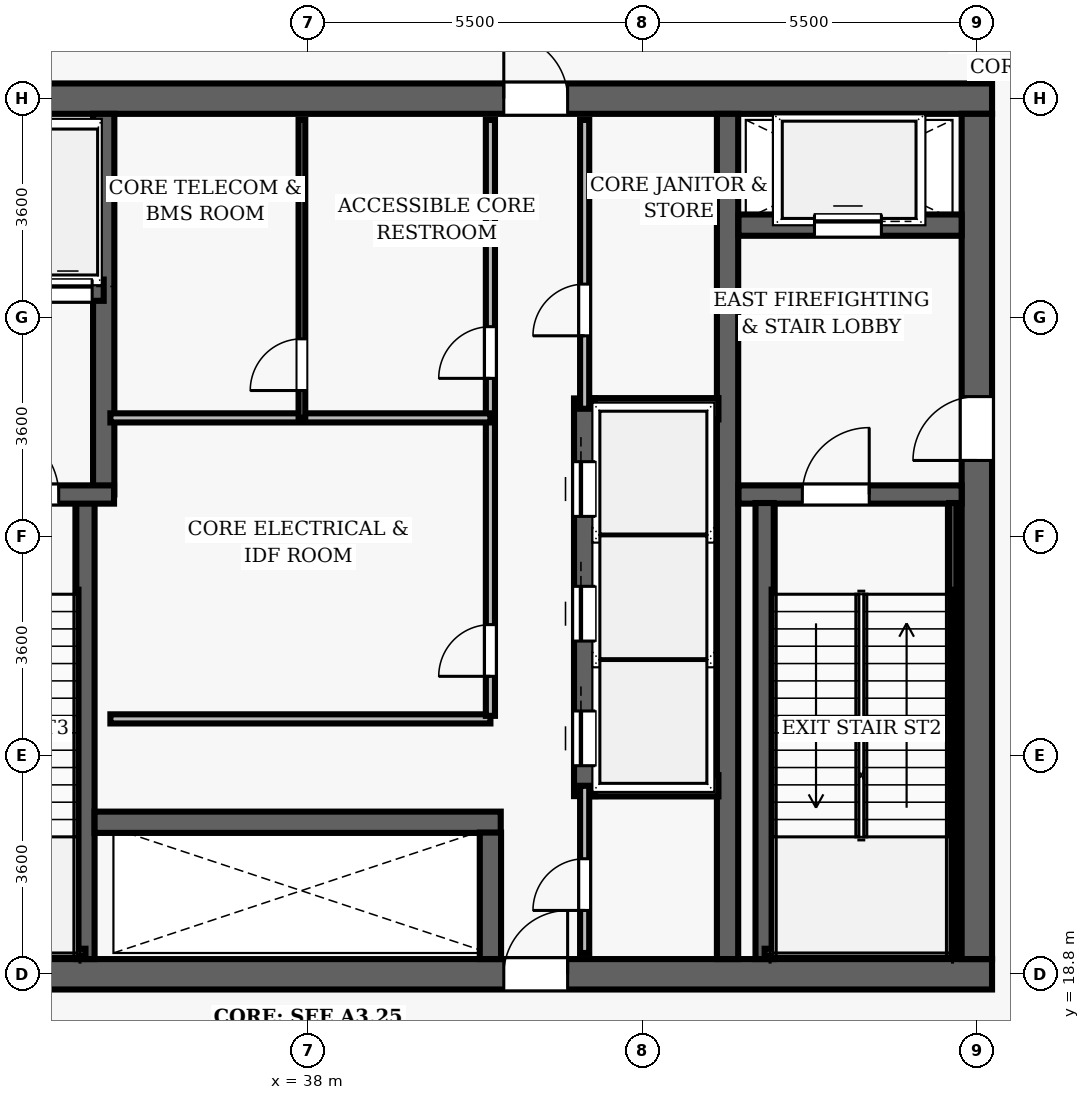
"""IFC4 building model, lengths in metres.
Left out: names, types, materials, properties, quantities, classifications, styles, units other than length and angle.
Written with IfcOpenShell. Run it as: python <this file> out.ifc"""

import sys

from ifc_helpers import new_model, si_unit, direction, frame, frame_2d, origin, place, context, subcontext, project, spatial, rectangle, extrude, element, fill, save


model = new_model("IFC4")
c1 = context("Model", 3, precision=1e-05, world=origin(), true_north=direction((0.0, 1.0)))
c2 = subcontext(c1, "Body", "Model", "MODEL_VIEW")
j1 = project(units=[si_unit("LENGTHUNIT", "METRE"), si_unit("PLANEANGLEUNIT", "RADIAN")], contexts=[c1])
p1 = place(None, origin())
s1 = spatial("IfcSite", under=j1, at=p1, CompositionType="ELEMENT")
p2 = place(p1, origin())
s2 = spatial("IfcBuilding", under=s1, at=p2, CompositionType="ELEMENT")
p3 = place(p2, frame((0.0, 0.0, 236.65)))
s3 = spatial("IfcBuildingStorey", under=s2, at=p3, CompositionType="ELEMENT", Elevation=236.65)
p4 = place(p3, frame((26.75, 18.8, 0.0), z_axis=(0.0, 0.0, 1.0), x_axis=(1.0, 0.0, 0.0)))
e1 = element("IfcWall", 1, at=p4, inside=s3, PredefinedType="SHEAR", context=c2, shape_type="SweptSolid", body=[
    extrude(rectangle(XDim=22.5, YDim=0.5, at=frame_2d((11.25, 0.0))), origin(), (0.0, 0.0, 1.0), 5.4),
])
p5 = place(p4, frame((14.47, 0.0, 0.0)))
e2 = element("IfcOpeningElement", 2, at=p5, cuts=e1, PredefinedType="OPENING", context=c2, shape_type="SweptSolid", body=[
    extrude(rectangle(XDim=1.05, YDim=2.15, at=frame_2d((0.525, 1.075))), frame((0.0, 0.26, 0.0), z_axis=(0.0, -1.0, 0.0), x_axis=(1.0, 0.0, 0.0)), (0.0, 0.0, 1.0), 0.52),
])
p6 = place(p3, frame((26.75, 33.2, 0.0), z_axis=(0.0, 0.0, 1.0), x_axis=(1.0, 0.0, 0.0)))
e3 = element("IfcWall", 3, at=p6, inside=s3, PredefinedType="SHEAR", context=c2, shape_type="SweptSolid", body=[
    extrude(rectangle(XDim=22.5, YDim=0.5, at=frame_2d((11.25, 0.0))), origin(), (0.0, 0.0, 1.0), 5.4),
])
p7 = place(p6, frame((4.57, 0.0, 0.0)))
e4 = element("IfcOpeningElement", 4, at=p7, cuts=e3, PredefinedType="OPENING", context=c2, shape_type="SweptSolid", body=[
    extrude(rectangle(XDim=1.05, YDim=2.15, at=frame_2d((0.525, 1.075))), frame((0.0, 0.26, 0.0), z_axis=(0.0, -1.0, 0.0), x_axis=(1.0, 0.0, 0.0)), (0.0, 0.0, 1.0), 0.52),
])
p8 = place(p6, frame((14.47, 0.0, 0.0)))
e5 = element("IfcOpeningElement", 5, at=p8, cuts=e3, PredefinedType="OPENING", context=c2, shape_type="SweptSolid", body=[
    extrude(rectangle(XDim=1.05, YDim=2.15, at=frame_2d((0.525, 1.075))), frame((0.0, 0.26, 0.0), z_axis=(0.0, -1.0, 0.0), x_axis=(1.0, 0.0, 0.0)), (0.0, 0.0, 1.0), 0.52),
])
p9 = place(p3, frame((49.0, 19.05, 0.0), z_axis=(0.0, 0.0, 1.0), x_axis=(0.0, 1.0, 0.0)))
e6 = element("IfcWall", 6, at=p9, inside=s3, PredefinedType="SHEAR", context=c2, shape_type="SweptSolid", body=[
    extrude(rectangle(XDim=13.9, YDim=0.5, at=frame_2d((6.95, 0.0))), origin(), (0.0, 0.0, 1.0), 5.4),
])
p10 = place(p9, frame((8.2, 0.0, 0.0)))
e7 = element("IfcOpeningElement", 7, at=p10, cuts=e6, PredefinedType="OPENING", context=c2, shape_type="SweptSolid", body=[
    extrude(rectangle(XDim=1.05, YDim=2.15, at=frame_2d((0.525, 1.075))), frame((0.0, 0.26, 0.0), z_axis=(0.0, -1.0, 0.0), x_axis=(1.0, 0.0, 0.0)), (0.0, 0.0, 1.0), 0.52),
])
p11 = place(p3, frame((44.9, 19.05, 0.0), z_axis=(0.0, 0.0, 1.0), x_axis=(0.0, 1.0, 0.0)))
e8 = element("IfcWall", 8, at=p11, inside=s3, PredefinedType="SHEAR", context=c2, shape_type="SweptSolid", body=[
    extrude(rectangle(XDim=13.9, YDim=0.35, at=frame_2d((6.95, 0.0))), origin(), (0.0, 0.0, 1.0), 5.4),
])
p12 = place(p3, frame((45.08, 26.69, 0.0), z_axis=(0.0, 0.0, 1.0), x_axis=(1.0, 0.0, 0.0)))
e9 = element("IfcWall", 9, at=p12, inside=s3, PredefinedType="SHEAR", context=c2, shape_type="SweptSolid", body=[
    extrude(rectangle(XDim=3.67, YDim=0.3, at=frame_2d((1.835, 0.0))), origin(), (0.0, 0.0, 1.0), 5.4),
])
p13 = place(p12, frame((1.05, 0.0, 0.0)))
e10 = element("IfcOpeningElement", 10, at=p13, cuts=e9, PredefinedType="OPENING", context=c2, shape_type="SweptSolid", body=[
    extrude(rectangle(XDim=1.1, YDim=2.15, at=frame_2d((0.55, 1.075))), frame((0.0, 0.16, 0.0), z_axis=(0.0, -1.0, 0.0), x_axis=(1.0, 0.0, 0.0)), (0.0, 0.0, 1.0), 0.32),
])
p14 = place(p3, frame((45.51, 19.05, 0.0), z_axis=(0.0, 0.0, 1.0), x_axis=(0.0, 1.0, 0.0)))
e11 = element("IfcWall", 11, at=p14, inside=s3, PredefinedType="SHEAR", context=c2, shape_type="SweptSolid", body=[
    extrude(rectangle(XDim=7.5, YDim=0.3, at=frame_2d((3.75, 0.0))), origin(), (0.0, 0.0, 1.0), 5.4),
])
p15 = place(p3, frame((48.605, 19.1, 0.0), z_axis=(0.0, 0.0, 1.0), x_axis=(0.0, 1.0, 0.0)))
e12 = element("IfcWall", 12, at=p15, inside=s3, PredefinedType="SHEAR", context=c2, shape_type="SweptSolid", body=[
    extrude(rectangle(XDim=7.45, YDim=0.12, at=frame_2d((3.725, 0.0))), origin(), (0.0, 0.0, 1.0), 5.4),
])
p16 = place(p3, frame((45.51, 19.16, 0.0), z_axis=(0.0, 0.0, 1.0), x_axis=(1.0, 0.0, 0.0)))
e13 = element("IfcWall", 13, at=p16, inside=s3, PredefinedType="SHEAR", context=c2, shape_type="SweptSolid", body=[
    extrude(rectangle(XDim=3.095, YDim=0.12, at=frame_2d((1.547, 0.0))), origin(), (0.0, 0.0, 1.0), 5.4),
])
p17 = place(p3, frame((45.08, 31.12, 0.0), z_axis=(0.0, 0.0, 1.0), x_axis=(1.0, 0.0, 0.0)))
e14 = element("IfcWall", 14, at=p17, inside=s3, PredefinedType="SHEAR", context=c2, shape_type="SweptSolid", body=[
    extrude(rectangle(XDim=3.67, YDim=0.35, at=frame_2d((1.835, 0.0))), origin(), (0.0, 0.0, 1.0), 4.04),
])
p18 = place(p17, frame((1.25, 0.0, 0.0)))
e15 = element("IfcOpeningElement", 15, at=p18, cuts=e14, PredefinedType="OPENING", context=c2, shape_type="SweptSolid", body=[
    extrude(rectangle(XDim=1.1, YDim=2.15, at=frame_2d((0.55, 1.075))), frame((0.0, 0.185, 0.0), z_axis=(0.0, -1.0, 0.0), x_axis=(1.0, 0.0, 0.0)), (0.0, 0.0, 1.0), 0.37),
])
p19 = place(p3, frame((34.34, 19.05, 0.0), z_axis=(0.0, 0.0, 1.0), x_axis=(0.0, 1.0, 0.0)))
e16 = element("IfcWall", 16, at=p19, inside=s3, PredefinedType="SHEAR", context=c2, shape_type="SweptSolid", body=[
    extrude(rectangle(XDim=7.5, YDim=0.3, at=frame_2d((3.75, 0.0))), origin(), (0.0, 0.0, 1.0), 5.4),
])
p20 = place(p3, frame((34.64, 26.69, 0.0), z_axis=(0.0, 0.0, 1.0), x_axis=(0.0, 1.0, 0.0)))
e17 = element("IfcWall", 17, at=p20, inside=s3, PredefinedType="SHEAR", context=c2, shape_type="SweptSolid", body=[
    extrude(rectangle(XDim=6.26, YDim=0.35, at=frame_2d((3.13, 0.0))), origin(), (0.0, 0.0, 1.0), 5.4),
])
p21 = place(p3, frame((31.25, 26.69, 0.0), z_axis=(0.0, 0.0, 1.0), x_axis=(1.0, 0.0, 0.0)))
e18 = element("IfcWall", 18, at=p21, inside=s3, PredefinedType="SHEAR", context=c2, shape_type="SweptSolid", body=[
    extrude(rectangle(XDim=3.56, YDim=0.3, at=frame_2d((1.78, 0.0))), origin(), (0.0, 0.0, 1.0), 5.4),
])
p22 = place(p21, frame((1.55, 0.0, 0.0)))
e19 = element("IfcOpeningElement", 19, at=p22, cuts=e18, PredefinedType="OPENING", context=c2, shape_type="SweptSolid", body=[
    extrude(rectangle(XDim=1.1, YDim=2.15, at=frame_2d((0.55, 1.075))), frame((0.0, 0.16, 0.0), z_axis=(0.0, -1.0, 0.0), x_axis=(1.0, 0.0, 0.0)), (0.0, 0.0, 1.0), 0.32),
])
p23 = place(p3, frame((31.3, 19.16, 0.0), z_axis=(0.0, 0.0, 1.0), x_axis=(1.0, 0.0, 0.0)))
e20 = element("IfcWall", 20, at=p23, inside=s3, PredefinedType="SHEAR", context=c2, shape_type="SweptSolid", body=[
    extrude(rectangle(XDim=3.04, YDim=0.12, at=frame_2d((1.52, 0.0))), origin(), (0.0, 0.0, 1.0), 5.4),
])
p24 = place(p3, frame((32.23, 30.05, 0.0), z_axis=(0.0, 0.0, 1.0), x_axis=(1.0, 0.0, 0.0)))
e21 = element("IfcWall", 21, at=p24, inside=s3, PredefinedType="SHEAR", context=c2, shape_type="SweptSolid", body=[
    extrude(rectangle(XDim=2.41, YDim=0.35, at=frame_2d((1.205, 0.0))), origin(), (0.0, 0.0, 1.0), 4.04),
])
p25 = place(p24, frame((0.42, 0.0, 0.0)))
e22 = element("IfcOpeningElement", 22, at=p25, cuts=e21, PredefinedType="OPENING", context=c2, shape_type="SweptSolid", body=[
    extrude(rectangle(XDim=0.8, YDim=2.15, at=frame_2d((0.4, 1.075))), frame((0.0, 0.185, 0.0), z_axis=(0.0, -1.0, 0.0), x_axis=(1.0, 0.0, 0.0)), (0.0, 0.0, 1.0), 0.37),
])
p26 = place(p24, frame((1.42, 0.0, 0.0)))
e23 = element("IfcOpeningElement", 23, at=p26, cuts=e21, PredefinedType="OPENING", context=c2, shape_type="SweptSolid", body=[
    extrude(rectangle(XDim=0.8, YDim=2.15, at=frame_2d((0.4, 1.075))), frame((0.0, 0.185, 0.0), z_axis=(0.0, -1.0, 0.0), x_axis=(1.0, 0.0, 0.0)), (0.0, 0.0, 1.0), 0.37),
])
p27 = place(p3, frame((42.55, 21.73, 0.0), z_axis=(0.0, 0.0, 1.0), x_axis=(0.0, 1.0, 0.0)))
e24 = element("IfcWall", 24, at=p27, inside=s3, PredefinedType="SHEAR", context=c2, shape_type="SweptSolid", body=[
    extrude(rectangle(XDim=6.54, YDim=0.35, at=frame_2d((3.27, 0.0))), origin(), (0.0, 0.0, 1.0), 4.04),
])
p28 = place(p27, frame((0.5, 0.0, 0.0)))
e25 = element("IfcOpeningElement", 25, at=p28, cuts=e24, PredefinedType="OPENING", context=c2, shape_type="SweptSolid", body=[
    extrude(rectangle(XDim=0.9, YDim=2.15, at=frame_2d((0.45, 1.075))), frame((0.0, 0.185, 0.0), z_axis=(0.0, -1.0, 0.0), x_axis=(1.0, 0.0, 0.0)), (0.0, 0.0, 1.0), 0.37),
])
p29 = place(p27, frame((2.55, 0.0, 0.0)))
e26 = element("IfcOpeningElement", 26, at=p29, cuts=e24, PredefinedType="OPENING", context=c2, shape_type="SweptSolid", body=[
    extrude(rectangle(XDim=0.9, YDim=2.15, at=frame_2d((0.45, 1.075))), frame((0.0, 0.185, 0.0), z_axis=(0.0, -1.0, 0.0), x_axis=(1.0, 0.0, 0.0)), (0.0, 0.0, 1.0), 0.37),
])
p30 = place(p27, frame((4.6, 0.0, 0.0)))
e27 = element("IfcOpeningElement", 27, at=p30, cuts=e24, PredefinedType="OPENING", context=c2, shape_type="SweptSolid", body=[
    extrude(rectangle(XDim=0.9, YDim=2.15, at=frame_2d((0.45, 1.075))), frame((0.0, 0.185, 0.0), z_axis=(0.0, -1.0, 0.0), x_axis=(1.0, 0.0, 0.0)), (0.0, 0.0, 1.0), 0.37),
])
for number, where, z_axis, x_axis in (
    (28, (42.72, 21.9, 0.0), (0.0, 0.0, 1.0), (1.0, 0.0, 0.0)),
    (29, (42.72, 28.1, 0.0), (0.0, 0.0, 1.0), (1.0, 0.0, 0.0)),
):
    element("IfcWall", number, at=place(p3, frame(where, z_axis=z_axis, x_axis=x_axis)), inside=s3, PredefinedType="SHEAR", context=c2, shape_type="SweptSolid", body=[
        extrude(rectangle(XDim=2.03, YDim=0.35, at=frame_2d((1.015, 0.0))), origin(), (0.0, 0.0, 1.0), 4.04),
    ])
p31 = place(p3, frame((34.49, 21.3, 0.0), z_axis=(0.0, 0.0, 1.0), x_axis=(1.0, 0.0, 0.0)))
e30 = element("IfcWall", 30, at=p31, inside=s3, PredefinedType="SHEAR", context=c2, shape_type="SweptSolid", body=[
    extrude(rectangle(XDim=6.68, YDim=0.35, at=frame_2d((3.34, 0.0))), origin(), (0.0, 0.0, 1.0), 4.04),
])
p32 = place(p3, frame((41.0, 19.05, 0.0), z_axis=(0.0, 0.0, 1.0), x_axis=(0.0, 1.0, 0.0)))
e31 = element("IfcWall", 31, at=p32, inside=s3, PredefinedType="SHEAR", context=c2, shape_type="SweptSolid", body=[
    extrude(rectangle(XDim=2.08, YDim=0.35, at=frame_2d((1.04, 0.0))), origin(), (0.0, 0.0, 1.0), 4.04),
])
p33 = place(p3, frame((34.75, 23.0, 0.0), z_axis=(0.0, 0.0, 1.0), x_axis=(1.0, 0.0, 0.0)))
e32 = element("IfcWall", 32, at=p33, inside=s3, PredefinedType="PARTITIONING", context=c2, shape_type="SweptSolid", body=[
    extrude(rectangle(XDim=6.25, YDim=0.15, at=frame_2d((3.125, 0.0))), origin(), (0.0, 0.0, 1.0), 4.04),
])
p34 = place(p3, frame((41.0, 23.05, 0.0), z_axis=(0.0, 0.0, 1.0), x_axis=(0.0, 1.0, 0.0)))
e33 = element("IfcWall", 33, at=p34, inside=s3, PredefinedType="PARTITIONING", context=c2, shape_type="SweptSolid", body=[
    extrude(rectangle(XDim=9.8, YDim=0.15, at=frame_2d((4.9, 0.0))), origin(), (0.0, 0.0, 1.0), 4.04),
])
p35 = place(p34, frame((0.65, 0.0, 0.0)))
e34 = element("IfcOpeningElement", 34, at=p35, cuts=e33, PredefinedType="OPENING", context=c2, shape_type="SweptSolid", body=[
    extrude(rectangle(XDim=0.85, YDim=2.1, at=frame_2d((0.425, 1.05))), frame((0.0, 0.085, 0.0), z_axis=(0.0, -1.0, 0.0), x_axis=(1.0, 0.0, 0.0)), (0.0, 0.0, 1.0), 0.17),
])
p36 = place(p34, frame((5.55, 0.0, 0.0)))
e35 = element("IfcOpeningElement", 35, at=p36, cuts=e33, PredefinedType="OPENING", context=c2, shape_type="SweptSolid", body=[
    extrude(rectangle(XDim=0.85, YDim=2.1, at=frame_2d((0.425, 1.05))), frame((0.0, 0.085, 0.0), z_axis=(0.0, -1.0, 0.0), x_axis=(1.0, 0.0, 0.0)), (0.0, 0.0, 1.0), 0.17),
])
p37 = place(p3, frame((34.75, 27.95, 0.0), z_axis=(0.0, 0.0, 1.0), x_axis=(1.0, 0.0, 0.0)))
e36 = element("IfcWall", 36, at=p37, inside=s3, PredefinedType="PARTITIONING", context=c2, shape_type="SweptSolid", body=[
    extrude(rectangle(XDim=6.25, YDim=0.15, at=frame_2d((3.125, 0.0))), origin(), (0.0, 0.0, 1.0), 4.04),
])
p38 = place(p3, frame((37.9, 27.95, 0.0), z_axis=(0.0, 0.0, 1.0), x_axis=(0.0, 1.0, 0.0)))
e37 = element("IfcWall", 37, at=p38, inside=s3, PredefinedType="PARTITIONING", context=c2, shape_type="SweptSolid", body=[
    extrude(rectangle(XDim=4.9, YDim=0.11, at=frame_2d((2.45, 0.0))), origin(), (0.0, 0.0, 1.0), 4.04),
])
p39 = place(p38, frame((0.45, 0.0, 0.0)))
e38 = element("IfcOpeningElement", 38, at=p39, cuts=e37, PredefinedType="OPENING", context=c2, shape_type="SweptSolid", body=[
    extrude(rectangle(XDim=0.85, YDim=2.1, at=frame_2d((0.425, 1.05))), frame((0.0, 0.065, 0.0), z_axis=(0.0, -1.0, 0.0), x_axis=(1.0, 0.0, 0.0)), (0.0, 0.0, 1.0), 0.13),
])
p40 = place(p3, frame((42.55, 28.1, 0.0), z_axis=(0.0, 0.0, 1.0), x_axis=(0.0, 1.0, 0.0)))
e39 = element("IfcWall", 39, at=p40, inside=s3, PredefinedType="PARTITIONING", context=c2, shape_type="SweptSolid", body=[
    extrude(rectangle(XDim=4.75, YDim=0.15, at=frame_2d((2.375, 0.0))), origin(), (0.0, 0.0, 1.0), 4.04),
])
p41 = place(p40, frame((1.2, 0.0, 0.0)))
e40 = element("IfcOpeningElement", 40, at=p41, cuts=e39, PredefinedType="OPENING", context=c2, shape_type="SweptSolid", body=[
    extrude(rectangle(XDim=0.85, YDim=2.1, at=frame_2d((0.425, 1.05))), frame((0.0, 0.085, 0.0), z_axis=(0.0, -1.0, 0.0), x_axis=(1.0, 0.0, 0.0)), (0.0, 0.0, 1.0), 0.17),
])
p42 = place(p3, frame((42.55, 19.15, 0.0), z_axis=(0.0, 0.0, 1.0), x_axis=(0.0, 1.0, 0.0)))
e41 = element("IfcWall", 41, at=p42, inside=s3, PredefinedType="PARTITIONING", context=c2, shape_type="SweptSolid", body=[
    extrude(rectangle(XDim=2.75, YDim=0.15, at=frame_2d((1.375, 0.0))), origin(), (0.0, 0.0, 1.0), 4.04),
])
p43 = place(p42, frame((0.7, 0.0, 0.0)))
e42 = element("IfcOpeningElement", 42, at=p43, cuts=e41, PredefinedType="OPENING", context=c2, shape_type="SweptSolid", body=[
    extrude(rectangle(XDim=0.85, YDim=2.1, at=frame_2d((0.425, 1.05))), frame((0.0, 0.085, 0.0), z_axis=(0.0, -1.0, 0.0), x_axis=(1.0, 0.0, 0.0)), (0.0, 0.0, 1.0), 0.17),
])
p44 = place(p13, origin())
e43 = element("IfcDoor", 43, at=p44, inside=s3, OperationType="SINGLE_SWING_RIGHT", PredefinedType="DOOR", context=c2, shape_type="SweptSolid", body=[
    extrude(rectangle(XDim=1.1, YDim=2.15, at=frame_2d((0.55, 1.075))), frame((0.0, 0.025, 0.0), z_axis=(0.0, -1.0, 0.0), x_axis=(1.0, 0.0, 0.0)), (0.0, 0.0, 1.0), 0.05),
])
fill(e10, e43)
p45 = place(p10, origin())
e44 = element("IfcDoor", 44, at=p45, inside=s3, OperationType="SINGLE_SWING_LEFT", PredefinedType="DOOR", context=c2, shape_type="SweptSolid", body=[
    extrude(rectangle(XDim=1.05, YDim=2.15, at=frame_2d((0.525, 1.075))), frame((0.0, 0.025, 0.0), z_axis=(0.0, -1.0, 0.0), x_axis=(1.0, 0.0, 0.0)), (0.0, 0.0, 1.0), 0.05),
])
fill(e7, e44)
p46 = place(p22, origin())
e45 = element("IfcDoor", 45, at=p46, inside=s3, OperationType="SINGLE_SWING_LEFT", PredefinedType="DOOR", context=c2, shape_type="SweptSolid", body=[
    extrude(rectangle(XDim=1.1, YDim=2.15, at=frame_2d((0.55, 1.075))), frame((0.0, 0.025, 0.0), z_axis=(0.0, -1.0, 0.0), x_axis=(1.0, 0.0, 0.0)), (0.0, 0.0, 1.0), 0.05),
])
fill(e19, e45)
p47 = place(p8, origin())
e46 = element("IfcDoor", 46, at=p47, inside=s3, OperationType="SINGLE_SWING_LEFT", PredefinedType="DOOR", context=c2, shape_type="SweptSolid", body=[
    extrude(rectangle(XDim=1.05, YDim=2.15, at=frame_2d((0.525, 1.075))), frame((0.0, 0.025, 0.0), z_axis=(0.0, -1.0, 0.0), x_axis=(1.0, 0.0, 0.0)), (0.0, 0.0, 1.0), 0.05),
])
fill(e5, e46)
p48 = place(p5, origin())
e47 = element("IfcDoor", 47, at=p48, inside=s3, OperationType="SINGLE_SWING_RIGHT", PredefinedType="DOOR", context=c2, shape_type="SweptSolid", body=[
    extrude(rectangle(XDim=1.05, YDim=2.15, at=frame_2d((0.525, 1.075))), frame((0.0, 0.025, 0.0), z_axis=(0.0, -1.0, 0.0), x_axis=(1.0, 0.0, 0.0)), (0.0, 0.0, 1.0), 0.05),
])
fill(e2, e47)
p49 = place(p35, origin())
e48 = element("IfcDoor", 48, at=p49, inside=s3, OperationType="SINGLE_SWING_LEFT", PredefinedType="DOOR", context=c2, shape_type="SweptSolid", body=[
    extrude(rectangle(XDim=0.85, YDim=2.1, at=frame_2d((0.425, 1.05))), frame((0.0, 0.025, 0.0), z_axis=(0.0, -1.0, 0.0), x_axis=(1.0, 0.0, 0.0)), (0.0, 0.0, 1.0), 0.05),
])
fill(e34, e48)
p50 = place(p36, origin())
e49 = element("IfcDoor", 49, at=p50, inside=s3, OperationType="SINGLE_SWING_LEFT", PredefinedType="DOOR", context=c2, shape_type="SweptSolid", body=[
    extrude(rectangle(XDim=0.85, YDim=2.1, at=frame_2d((0.425, 1.05))), frame((0.0, 0.025, 0.0), z_axis=(0.0, -1.0, 0.0), x_axis=(1.0, 0.0, 0.0)), (0.0, 0.0, 1.0), 0.05),
])
fill(e35, e49)
p51 = place(p39, origin())
e50 = element("IfcDoor", 50, at=p51, inside=s3, OperationType="SINGLE_SWING_LEFT", PredefinedType="DOOR", context=c2, shape_type="SweptSolid", body=[
    extrude(rectangle(XDim=0.85, YDim=2.1, at=frame_2d((0.425, 1.05))), frame((0.0, 0.025, 0.0), z_axis=(0.0, -1.0, 0.0), x_axis=(1.0, 0.0, 0.0)), (0.0, 0.0, 1.0), 0.05),
])
fill(e38, e50)
p52 = place(p41, origin())
e51 = element("IfcDoor", 51, at=p52, inside=s3, OperationType="SINGLE_SWING_LEFT", PredefinedType="DOOR", context=c2, shape_type="SweptSolid", body=[
    extrude(rectangle(XDim=0.85, YDim=2.1, at=frame_2d((0.425, 1.05))), frame((0.0, 0.025, 0.0), z_axis=(0.0, -1.0, 0.0), x_axis=(1.0, 0.0, 0.0)), (0.0, 0.0, 1.0), 0.05),
])
fill(e40, e51)
p53 = place(p43, origin())
e52 = element("IfcDoor", 52, at=p53, inside=s3, OperationType="SINGLE_SWING_LEFT", PredefinedType="DOOR", context=c2, shape_type="SweptSolid", body=[
    extrude(rectangle(XDim=0.85, YDim=2.1, at=frame_2d((0.425, 1.05))), frame((0.0, 0.025, 0.0), z_axis=(0.0, -1.0, 0.0), x_axis=(1.0, 0.0, 0.0)), (0.0, 0.0, 1.0), 0.05),
])
fill(e42, e52)
p54 = place(p28, origin())
e53 = element("IfcDoor", 53, at=p54, inside=s3, OperationType="SLIDING_TO_LEFT", PredefinedType="DOOR", context=c2, shape_type="SweptSolid", body=[
    extrude(rectangle(XDim=0.9, YDim=2.15, at=frame_2d((0.45, 1.075))), frame((0.0, 0.025, 0.0), z_axis=(0.0, -1.0, 0.0), x_axis=(1.0, 0.0, 0.0)), (0.0, 0.0, 1.0), 0.05),
])
fill(e25, e53)
p55 = place(p29, origin())
e54 = element("IfcDoor", 54, at=p55, inside=s3, OperationType="SLIDING_TO_LEFT", PredefinedType="DOOR", context=c2, shape_type="SweptSolid", body=[
    extrude(rectangle(XDim=0.9, YDim=2.15, at=frame_2d((0.45, 1.075))), frame((0.0, 0.025, 0.0), z_axis=(0.0, -1.0, 0.0), x_axis=(1.0, 0.0, 0.0)), (0.0, 0.0, 1.0), 0.05),
])
fill(e26, e54)
p56 = place(p30, origin())
e55 = element("IfcDoor", 55, at=p56, inside=s3, OperationType="SLIDING_TO_LEFT", PredefinedType="DOOR", context=c2, shape_type="SweptSolid", body=[
    extrude(rectangle(XDim=0.9, YDim=2.15, at=frame_2d((0.45, 1.075))), frame((0.0, 0.025, 0.0), z_axis=(0.0, -1.0, 0.0), x_axis=(1.0, 0.0, 0.0)), (0.0, 0.0, 1.0), 0.05),
])
fill(e27, e55)
p57 = place(p18, origin())
e56 = element("IfcDoor", 56, at=p57, inside=s3, OperationType="SLIDING_TO_LEFT", PredefinedType="DOOR", context=c2, shape_type="SweptSolid", body=[
    extrude(rectangle(XDim=1.1, YDim=2.15, at=frame_2d((0.55, 1.075))), frame((0.0, 0.025, 0.0), z_axis=(0.0, -1.0, 0.0), x_axis=(1.0, 0.0, 0.0)), (0.0, 0.0, 1.0), 0.05),
])
fill(e15, e56)
p58 = place(p26, origin())
e57 = element("IfcDoor", 57, at=p58, inside=s3, OperationType="SLIDING_TO_LEFT", PredefinedType="DOOR", context=c2, shape_type="SweptSolid", body=[
    extrude(rectangle(XDim=0.8, YDim=2.15, at=frame_2d((0.4, 1.075))), frame((0.0, 0.025, 0.0), z_axis=(0.0, -1.0, 0.0), x_axis=(1.0, 0.0, 0.0)), (0.0, 0.0, 1.0), 0.05),
])
fill(e23, e57)
save(model, sys.argv[1])
